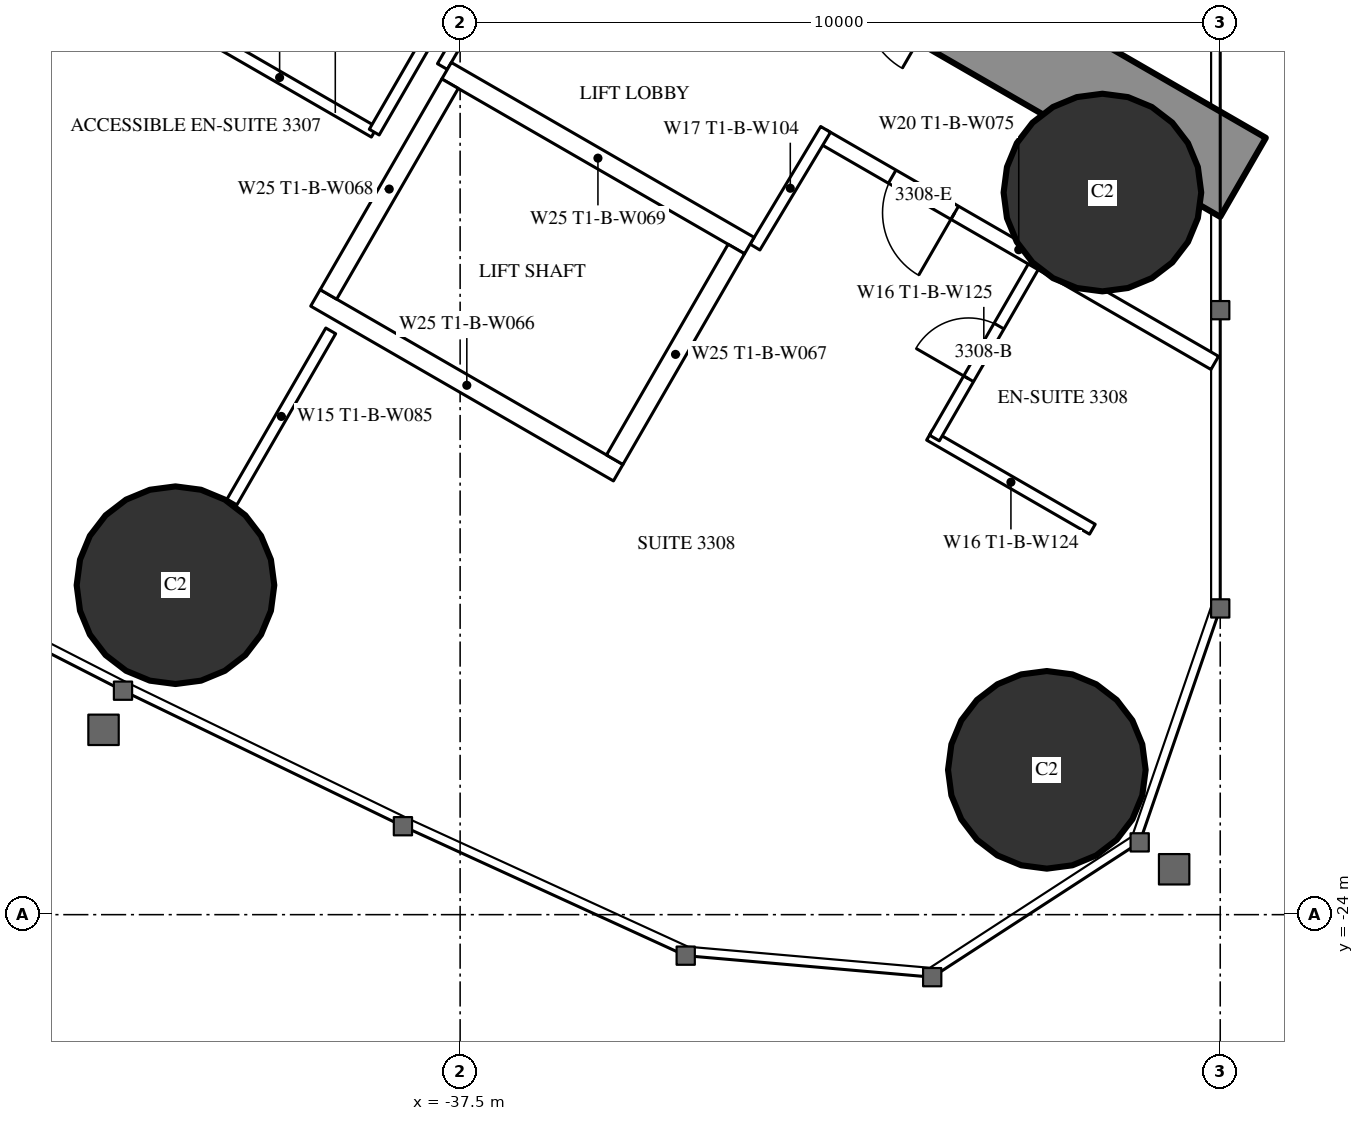
"""IFC4 building model, lengths in metres.
Left out: names, types, materials, properties, quantities, classifications, styles, units other than length and angle.
Written with IfcOpenShell. Run it as: python <this file> out.ifc"""

import sys

from ifc_helpers import new_model, si_unit, direction, frame, frame_2d, origin, origin_2d, place, context, subcontext, project, spatial, rectangle, hollow_circle, extrude, element, fill, save


model = new_model("IFC4")
c1 = context("Model", 3, precision=1e-05, world=origin(), true_north=direction((0.0, 1.0)))
c2 = subcontext(c1, "Body", "Model", "MODEL_VIEW")
j1 = project(units=[si_unit("LENGTHUNIT", "METRE"), si_unit("PLANEANGLEUNIT", "RADIAN")], contexts=[c1])
p1 = place(None, origin())
s1 = spatial("IfcSite", under=j1, at=p1, CompositionType="ELEMENT")
p2 = place(p1, origin())
s2 = spatial("IfcBuilding", under=s1, at=p2, CompositionType="ELEMENT")
p3 = place(p2, frame((0.0, 0.0, 125.6)))
s3 = spatial("IfcBuildingStorey", under=s2, at=p3, CompositionType="ELEMENT", Elevation=125.6)
for number, where, z_axis, x_axis in (
    (1, (-29.781, -22.095, 0.0), (0.0, 0.0, 1.0), (1.0, 0.0, 0.0)),
    (2, (-29.05, -14.5, 0.0), (0.0, 0.0, 1.0), (1.0, 0.0, 0.0)),
    (3, (-41.245, -19.666, 0.0), (0.0, 0.0, 1.0), (1.0, 0.0, 0.0)),
):
    element("IfcColumn", number, at=place(p3, frame(where, z_axis=z_axis, x_axis=x_axis)), inside=s3, PredefinedType="COLUMN", context=c2, shape_type="SweptSolid", body=[
        extrude(hollow_circle(Radius=1.3, WallThickness=0.1, at=origin_2d()), origin(), (0.0, 0.0, 1.0), 3.5),
    ])
p4 = place(p3, frame((-27.2, -14.3, 0.0), z_axis=(0.0, 0.0, 1.0), x_axis=(-0.866024021859, 0.500002393557, 0.0)))
e4 = element("IfcWall", 4, at=p4, inside=s3, PredefinedType="SHEAR", context=c2, shape_type="SweptSolid", body=[
    extrude(rectangle(XDim=27.907, YDim=1.2, at=frame_2d((13.954, 0.0))), origin(), (0.0, 0.0, 1.0), 3.5),
])
p5 = place(p4, frame((4.6, 0.0, 0.0)))
e5 = element("IfcOpeningElement", 5, at=p5, cuts=e4, PredefinedType="OPENING", context=c2, shape_type="SweptSolid", body=[
    extrude(rectangle(XDim=1.0, YDim=2.2, at=frame_2d((0.5, 1.1))), frame((0.0, 0.61, 0.0), z_axis=(0.0, -1.0, 0.0), x_axis=(1.0, 0.0, 0.0)), (0.0, 0.0, 1.0), 1.22),
])
p6 = place(p4, frame((13.395, 0.0, 0.0)))
e6 = element("IfcOpeningElement", 6, at=p6, cuts=e4, PredefinedType="OPENING", context=c2, shape_type="SweptSolid", body=[
    extrude(rectangle(XDim=1.8, YDim=2.2, at=frame_2d((0.9, 1.1))), frame((0.0, 0.61, 0.0), z_axis=(0.0, -1.0, 0.0), x_axis=(1.0, 0.0, 0.0)), (0.0, 0.0, 1.0), 1.22),
])
p7 = place(p3, frame((-39.202, -16.32, 0.0), z_axis=(0.0, 0.0, 1.0), x_axis=(-0.49997716683, -0.86603858612, 0.0)))
e7 = element("IfcWall", 7, at=p7, inside=s3, PredefinedType="PARTITIONING", context=c2, shape_type="SweptSolid", body=[
    extrude(rectangle(XDim=2.6, YDim=0.15, at=frame_2d((1.3, 0.0))), origin(), (0.0, 0.0, 1.0), 3.25),
])
p8 = place(p3, frame((-27.572, -16.741, 0.0), z_axis=(0.0, 0.0, 1.0), x_axis=(-0.866024464444, 0.500001626982, 0.0)))
e8 = element("IfcWall", 8, at=p8, inside=s3, PredefinedType="PARTITIONING", context=c2, shape_type="SweptSolid", body=[
    extrude(rectangle(XDim=5.955, YDim=0.2, at=frame_2d((2.978, 0.0))), origin(), (0.0, 0.0, 1.0), 3.25),
])
p9 = place(p8, frame((3.95, 0.0, 0.0)))
e9 = element("IfcOpeningElement", 9, at=p9, cuts=e8, PredefinedType="OPENING", context=c2, shape_type="SweptSolid", body=[
    extrude(rectangle(XDim=0.95, YDim=2.2, at=frame_2d((0.475, 1.1))), frame((0.0, 0.11, 0.0), z_axis=(0.0, -1.0, 0.0), x_axis=(1.0, 0.0, 0.0)), (0.0, 0.0, 1.0), 0.22),
])
p10 = place(p3, frame((-36.831, -11.28, 0.0), z_axis=(0.0, 0.0, 1.0), x_axis=(-0.499937177781, -0.866061671171, 0.0)))
e10 = element("IfcWall", 10, at=p10, inside=s3, PredefinedType="PARTITIONING", context=c2, shape_type="SweptSolid", body=[
    extrude(rectangle(XDim=1.804, YDim=0.15, at=frame_2d((0.902, 0.0))), origin(), (0.0, 0.0, 1.0), 3.25),
])
p11 = place(p3, frame((-33.621, -15.218, 0.0), z_axis=(0.0, 0.0, 1.0), x_axis=(0.514336634837, 0.857588377991, 0.0)))
e11 = element("IfcWall", 11, at=p11, inside=s3, PredefinedType="PARTITIONING", context=c2, shape_type="SweptSolid", body=[
    extrude(rectangle(XDim=1.805, YDim=0.15, at=frame_2d((0.903, 0.0))), origin(), (0.0, 0.0, 1.0), 3.25),
])
p12 = place(p3, frame((-38.63, -13.705, 0.0), z_axis=(0.0, 0.0, 1.0), x_axis=(-0.866018712932, 0.500011588718, 0.0)))
e12 = element("IfcWall", 12, at=p12, inside=s3, PredefinedType="PARTITIONING", context=c2, shape_type="SweptSolid", body=[
    extrude(rectangle(XDim=2.875, YDim=0.15, at=frame_2d((1.438, 0.0))), origin(), (0.0, 0.0, 1.0), 3.25),
])
p13 = place(p3, frame((-37.23, -11.281, 0.0), z_axis=(0.0, 0.0, 1.0), x_axis=(-0.500049511043, -0.865996816683, 0.0)))
e13 = element("IfcWall", 13, at=p13, inside=s3, PredefinedType="PARTITIONING", context=c2, shape_type="SweptSolid", body=[
    extrude(rectangle(XDim=2.8, YDim=0.15, at=frame_2d((1.4, 0.0))), origin(), (0.0, 0.0, 1.0), 3.25),
])
p14 = place(p3, frame((-29.182, -18.929, 0.0), z_axis=(0.0, 0.0, 1.0), x_axis=(-0.866006523861, 0.500032699561, 0.0)))
e14 = element("IfcWall", 14, at=p14, inside=s3, PredefinedType="PARTITIONING", context=c2, shape_type="SweptSolid", body=[
    extrude(rectangle(XDim=2.475, YDim=0.15, at=frame_2d((1.237, 0.0))), origin(), (0.0, 0.0, 1.0), 3.25),
])
p15 = place(p3, frame((-29.96, -15.478, 0.0), z_axis=(0.0, 0.0, 1.0), x_axis=(-0.500006934395, -0.866021400173, 0.0)))
e15 = element("IfcWall", 15, at=p15, inside=s3, PredefinedType="PARTITIONING", context=c2, shape_type="SweptSolid", body=[
    extrude(rectangle(XDim=2.6, YDim=0.15, at=frame_2d((1.3, 0.0))), origin(), (0.0, 0.0, 1.0), 3.25),
])
p16 = place(p15, frame((0.9, 0.0, 0.0)))
e16 = element("IfcOpeningElement", 16, at=p16, cuts=e15, PredefinedType="OPENING", context=c2, shape_type="SweptSolid", body=[
    extrude(rectangle(XDim=0.8, YDim=2.2, at=frame_2d((0.4, 1.1))), frame((0.0, 0.085, 0.0), z_axis=(0.0, -1.0, 0.0), x_axis=(1.0, 0.0, 0.0)), (0.0, 0.0, 1.0), 0.17),
])
p17 = place(p3, frame((-33.696, -15.197, 0.0), z_axis=(0.0, 0.0, 1.0), x_axis=(-0.865976953817, 0.500083908417, 0.0)))
e17 = element("IfcWall", 17, at=p17, inside=s3, PredefinedType="PARTITIONING", context=c2, shape_type="SweptSolid", body=[
    extrude(rectangle(XDim=4.599, YDim=0.25, at=frame_2d((2.3, 0.0))), origin(), (0.0, 0.0, 1.0), 3.25),
])
p18 = place(p3, frame((-35.42, -18.186, 0.0), z_axis=(0.0, 0.0, 1.0), x_axis=(-0.865990227814, 0.50006092162, 0.0)))
e18 = element("IfcWall", 18, at=p18, inside=s3, PredefinedType="PARTITIONING", context=c2, shape_type="SweptSolid", body=[
    extrude(rectangle(XDim=4.6, YDim=0.25, at=frame_2d((2.3, 0.0))), origin(), (0.0, 0.0, 1.0), 3.25),
])
p19 = place(p3, frame((-33.866, -15.243, 0.0), z_axis=(0.0, 0.0, 1.0), x_axis=(-0.499929347863, -0.866066190972, 0.0)))
e19 = element("IfcWall", 19, at=p19, inside=s3, PredefinedType="PARTITIONING", context=c2, shape_type="SweptSolid", body=[
    extrude(rectangle(XDim=3.201, YDim=0.25, at=frame_2d((1.6, 0.0))), origin(), (0.0, 0.0, 1.0), 3.25),
])
p20 = place(p3, frame((-37.633, -13.068, 0.0), z_axis=(0.0, 0.0, 1.0), x_axis=(-0.499872130319, -0.866099216793, 0.0)))
e20 = element("IfcWall", 20, at=p20, inside=s3, PredefinedType="PARTITIONING", context=c2, shape_type="SweptSolid", body=[
    extrude(rectangle(XDim=3.2, YDim=0.25, at=frame_2d((1.6, 0.0))), origin(), (0.0, 0.0, 1.0), 3.25),
])
p21 = place(p16, origin())
e21 = element("IfcDoor", 21, at=p21, inside=s3, OperationType="SINGLE_SWING_RIGHT", PredefinedType="DOOR", context=c2, shape_type="SweptSolid", body=[
    extrude(rectangle(XDim=0.8, YDim=2.2, at=frame_2d((0.4, 1.1))), frame((0.0, 0.025, 0.0), z_axis=(0.0, -1.0, 0.0), x_axis=(1.0, 0.0, 0.0)), (0.0, 0.0, 1.0), 0.05),
])
fill(e16, e21)
p22 = place(p9, origin())
e22 = element("IfcDoor", 22, at=p22, inside=s3, OperationType="SINGLE_SWING_LEFT", PredefinedType="DOOR", context=c2, shape_type="SweptSolid", body=[
    extrude(rectangle(XDim=0.95, YDim=2.2, at=frame_2d((0.475, 1.1))), frame((0.0, 0.025, 0.0), z_axis=(0.0, -1.0, 0.0), x_axis=(1.0, 0.0, 0.0)), (0.0, 0.0, 1.0), 0.05),
])
fill(e9, e22)
save(model, sys.argv[1])
